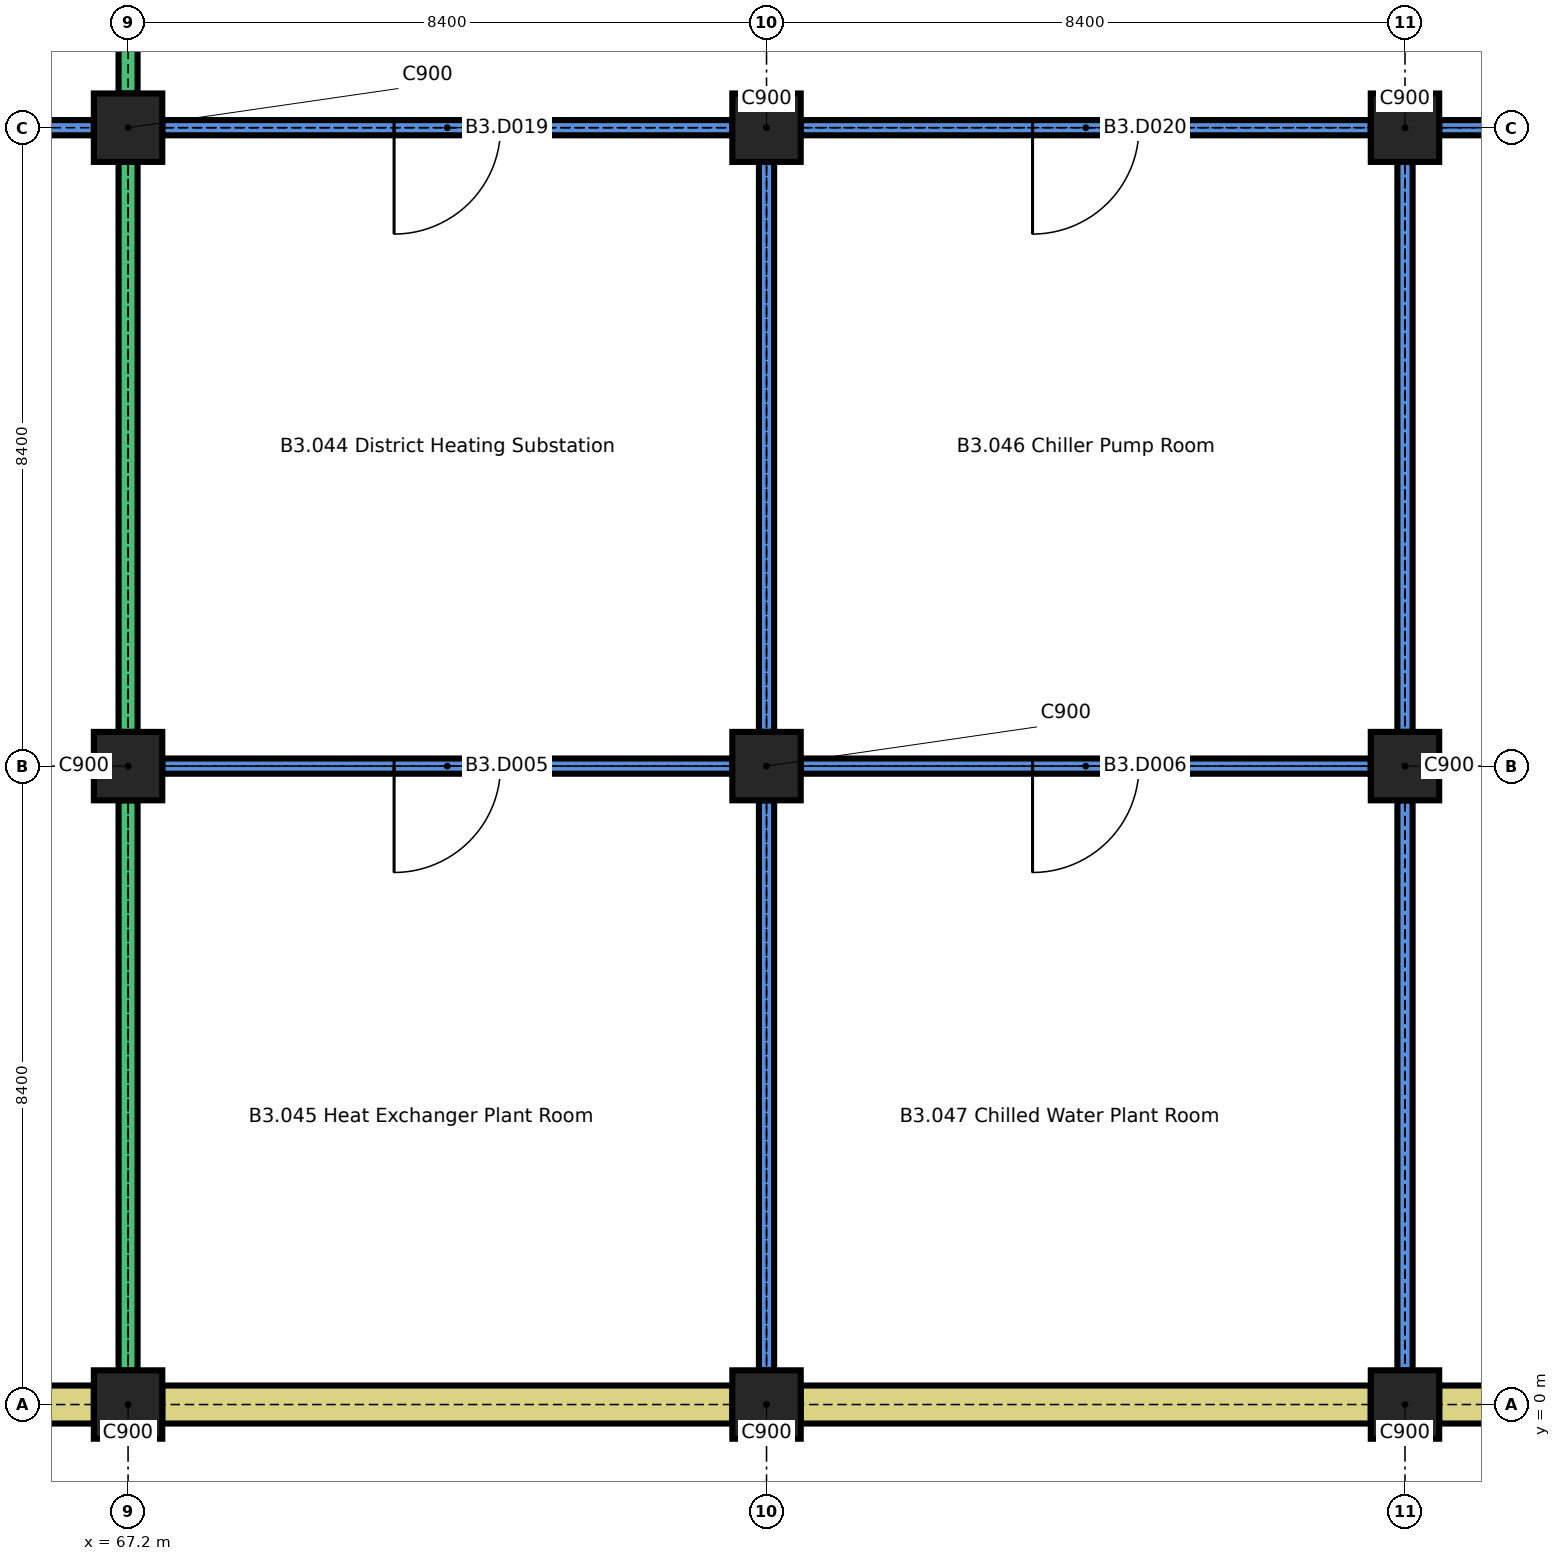
"""IFC4 building model, lengths in metres.
Left out: names, types, materials, properties, quantities, classifications, styles, units other than length and angle.
Written with IfcOpenShell. Run it as: python <this file> out.ifc"""

import sys

from ifc_helpers import new_model, si_unit, direction, frame, frame_2d, origin, origin_2d, place, context, subcontext, project, spatial, rectangle, extrude, element, fill, save


model = new_model("IFC4")
c1 = context("Model", 3, precision=1e-05, world=origin(), true_north=direction((0.0, 1.0)))
c2 = subcontext(c1, "Body", "Model", "MODEL_VIEW")
j1 = project(units=[si_unit("LENGTHUNIT", "METRE"), si_unit("PLANEANGLEUNIT", "RADIAN")], contexts=[c1])
p1 = place(None, origin())
s1 = spatial("IfcSite", under=j1, at=p1, CompositionType="ELEMENT")
p2 = place(p1, origin())
s2 = spatial("IfcBuilding", under=s1, at=p2, CompositionType="ELEMENT")
p3 = place(p2, frame((0.0, 0.0, -11.4)))
s3 = spatial("IfcBuildingStorey", under=s2, at=p3, CompositionType="ELEMENT", Elevation=-11.4)
for number, where, z_axis, x_axis in (
    (1, (67.2, 0.0, 0.0), (0.0, 0.0, 1.0), (1.0, 0.0, 0.0)),
    (2, (75.6, 0.0, 0.0), (0.0, 0.0, 1.0), (1.0, 0.0, 0.0)),
    (3, (84.0, 0.0, 0.0), (0.0, 0.0, 1.0), (1.0, 0.0, 0.0)),
    (4, (67.2, 8.4, 0.0), (0.0, 0.0, 1.0), (1.0, 0.0, 0.0)),
    (5, (75.6, 8.4, 0.0), (0.0, 0.0, 1.0), (1.0, 0.0, 0.0)),
    (6, (84.0, 8.4, 0.0), (0.0, 0.0, 1.0), (1.0, 0.0, 0.0)),
    (7, (67.2, 16.8, 0.0), (0.0, 0.0, 1.0), (1.0, 0.0, 0.0)),
    (8, (75.6, 16.8, 0.0), (0.0, 0.0, 1.0), (1.0, 0.0, 0.0)),
    (9, (84.0, 16.8, 0.0), (0.0, 0.0, 1.0), (1.0, 0.0, 0.0)),
):
    element("IfcColumn", number, at=place(p3, frame(where, z_axis=z_axis, x_axis=x_axis)), inside=s3, PredefinedType="COLUMN", context=c2, shape_type="SweptSolid", body=[
        extrude(rectangle(XDim=0.9, YDim=0.9, at=origin_2d()), origin(), (0.0, 0.0, 1.0), 3.2),
    ])
for number, where, z_axis, x_axis in (
    (10, (59.25, 0.0, 0.0), (0.0, 0.0, 1.0), (1.0, 0.0, 0.0)),
    (11, (67.65, 0.0, 0.0), (0.0, 0.0, 1.0), (1.0, 0.0, 0.0)),
    (12, (76.05, 0.0, 0.0), (0.0, 0.0, 1.0), (1.0, 0.0, 0.0)),
    (13, (84.45, 0.0, 0.0), (0.0, 0.0, 1.0), (1.0, 0.0, 0.0)),
):
    element("IfcWall", number, at=place(p3, frame(where, z_axis=z_axis, x_axis=x_axis)), inside=s3, PredefinedType="SOLIDWALL", context=c2, shape_type="SweptSolid", body=[
        extrude(rectangle(XDim=7.5, YDim=0.5, at=frame_2d((3.75, 0.0))), origin(), (0.0, 0.0, 1.0), 3.2),
    ])
p4 = place(p3, frame((67.65, 8.4, 0.0), z_axis=(0.0, 0.0, 1.0), x_axis=(1.0, 0.0, 0.0)))
e14 = element("IfcWall", 14, at=p4, inside=s3, PredefinedType="PARTITIONING", context=c2, shape_type="SweptSolid", body=[
    extrude(rectangle(XDim=7.5, YDim=0.2, at=frame_2d((3.75, 0.0))), origin(), (0.0, 0.0, 1.0), 3.2),
])
p5 = place(p4, frame((3.05, 0.0, 0.0)))
e15 = element("IfcOpeningElement", 15, at=p5, cuts=e14, PredefinedType="OPENING", context=c2, shape_type="SweptSolid", body=[
    extrude(rectangle(XDim=1.4, YDim=2.1, at=frame_2d((0.7, 1.05))), frame((0.0, 0.11, 0.0), z_axis=(0.0, -1.0, 0.0), x_axis=(1.0, 0.0, 0.0)), (0.0, 0.0, 1.0), 0.22),
])
p6 = place(p3, frame((76.05, 8.4, 0.0), z_axis=(0.0, 0.0, 1.0), x_axis=(1.0, 0.0, 0.0)))
e16 = element("IfcWall", 16, at=p6, inside=s3, PredefinedType="PARTITIONING", context=c2, shape_type="SweptSolid", body=[
    extrude(rectangle(XDim=7.5, YDim=0.2, at=frame_2d((3.75, 0.0))), origin(), (0.0, 0.0, 1.0), 3.2),
])
p7 = place(p6, frame((3.05, 0.0, 0.0)))
e17 = element("IfcOpeningElement", 17, at=p7, cuts=e16, PredefinedType="OPENING", context=c2, shape_type="SweptSolid", body=[
    extrude(rectangle(XDim=1.4, YDim=2.1, at=frame_2d((0.7, 1.05))), frame((0.0, 0.11, 0.0), z_axis=(0.0, -1.0, 0.0), x_axis=(1.0, 0.0, 0.0)), (0.0, 0.0, 1.0), 0.22),
])
p8 = place(p3, frame((59.25, 16.8, 0.0), z_axis=(0.0, 0.0, 1.0), x_axis=(1.0, 0.0, 0.0)))
e18 = element("IfcWall", 18, at=p8, inside=s3, PredefinedType="PARTITIONING", context=c2, shape_type="SweptSolid", body=[
    extrude(rectangle(XDim=7.5, YDim=0.2, at=frame_2d((3.75, 0.0))), origin(), (0.0, 0.0, 1.0), 3.2),
])
p9 = place(p8, frame((3.05, 0.0, 0.0)))
e19 = element("IfcOpeningElement", 19, at=p9, cuts=e18, PredefinedType="OPENING", context=c2, shape_type="SweptSolid", body=[
    extrude(rectangle(XDim=1.4, YDim=2.1, at=frame_2d((0.7, 1.05))), frame((0.0, 0.11, 0.0), z_axis=(0.0, -1.0, 0.0), x_axis=(1.0, 0.0, 0.0)), (0.0, 0.0, 1.0), 0.22),
])
p10 = place(p3, frame((67.65, 16.8, 0.0), z_axis=(0.0, 0.0, 1.0), x_axis=(1.0, 0.0, 0.0)))
e20 = element("IfcWall", 20, at=p10, inside=s3, PredefinedType="PARTITIONING", context=c2, shape_type="SweptSolid", body=[
    extrude(rectangle(XDim=7.5, YDim=0.2, at=frame_2d((3.75, 0.0))), origin(), (0.0, 0.0, 1.0), 3.2),
])
p11 = place(p10, frame((3.05, 0.0, 0.0)))
e21 = element("IfcOpeningElement", 21, at=p11, cuts=e20, PredefinedType="OPENING", context=c2, shape_type="SweptSolid", body=[
    extrude(rectangle(XDim=1.4, YDim=2.1, at=frame_2d((0.7, 1.05))), frame((0.0, 0.11, 0.0), z_axis=(0.0, -1.0, 0.0), x_axis=(1.0, 0.0, 0.0)), (0.0, 0.0, 1.0), 0.22),
])
p12 = place(p3, frame((76.05, 16.8, 0.0), z_axis=(0.0, 0.0, 1.0), x_axis=(1.0, 0.0, 0.0)))
e22 = element("IfcWall", 22, at=p12, inside=s3, PredefinedType="PARTITIONING", context=c2, shape_type="SweptSolid", body=[
    extrude(rectangle(XDim=7.5, YDim=0.2, at=frame_2d((3.75, 0.0))), origin(), (0.0, 0.0, 1.0), 3.2),
])
p13 = place(p12, frame((3.05, 0.0, 0.0)))
e23 = element("IfcOpeningElement", 23, at=p13, cuts=e22, PredefinedType="OPENING", context=c2, shape_type="SweptSolid", body=[
    extrude(rectangle(XDim=1.4, YDim=2.1, at=frame_2d((0.7, 1.05))), frame((0.0, 0.11, 0.0), z_axis=(0.0, -1.0, 0.0), x_axis=(1.0, 0.0, 0.0)), (0.0, 0.0, 1.0), 0.22),
])
p14 = place(p3, frame((84.45, 16.8, 0.0), z_axis=(0.0, 0.0, 1.0), x_axis=(1.0, 0.0, 0.0)))
e24 = element("IfcWall", 24, at=p14, inside=s3, PredefinedType="PARTITIONING", context=c2, shape_type="SweptSolid", body=[
    extrude(rectangle(XDim=15.9, YDim=0.2, at=frame_2d((7.95, 0.0))), origin(), (0.0, 0.0, 1.0), 3.2),
])
p15 = place(p14, frame((3.275, 0.0, 0.0)))
e25 = element("IfcOpeningElement", 25, at=p15, cuts=e24, PredefinedType="OPENING", context=c2, shape_type="SweptSolid", body=[
    extrude(rectangle(XDim=1.4, YDim=2.1, at=frame_2d((0.7, 1.05))), frame((0.0, 0.11, 0.0), z_axis=(0.0, -1.0, 0.0), x_axis=(1.0, 0.0, 0.0)), (0.0, 0.0, 1.0), 0.22),
])
p16 = place(p14, frame((13.325, 0.0, 0.0)))
e26 = element("IfcOpeningElement", 26, at=p16, cuts=e24, PredefinedType="OPENING", context=c2, shape_type="SweptSolid", body=[
    extrude(rectangle(XDim=1.4, YDim=2.1, at=frame_2d((0.7, 1.05))), frame((0.0, 0.11, 0.0), z_axis=(0.0, -1.0, 0.0), x_axis=(1.0, 0.0, 0.0)), (0.0, 0.0, 1.0), 0.22),
])
for number, where, z_axis, x_axis in (
    (27, (67.2, 0.45, 0.0), (0.0, 0.0, 1.0), (0.0, 1.0, 0.0)),
    (28, (67.2, 8.85, 0.0), (0.0, 0.0, 1.0), (0.0, 1.0, 0.0)),
):
    element("IfcWall", number, at=place(p3, frame(where, z_axis=z_axis, x_axis=x_axis)), inside=s3, PredefinedType="SOLIDWALL", context=c2, shape_type="SweptSolid", body=[
        extrude(rectangle(XDim=7.5, YDim=0.25, at=frame_2d((3.75, 0.0))), origin(), (0.0, 0.0, 1.0), 3.2),
    ])
p17 = place(p3, frame((67.2, 17.25, 0.0), z_axis=(0.0, 0.0, 1.0), x_axis=(0.0, 1.0, 0.0)))
e29 = element("IfcWall", 29, at=p17, inside=s3, PredefinedType="SOLIDWALL", context=c2, shape_type="SweptSolid", body=[
    extrude(rectangle(XDim=12.75, YDim=0.25, at=frame_2d((6.375, 0.0))), origin(), (0.0, 0.0, 1.0), 3.2),
])
p18 = place(p17, frame((1.475, 0.0, 0.0)))
e30 = element("IfcOpeningElement", 30, at=p18, cuts=e29, PredefinedType="OPENING", context=c2, shape_type="SweptSolid", body=[
    extrude(rectangle(XDim=1.4, YDim=2.1, at=frame_2d((0.7, 1.05))), frame((0.0, 0.135, 0.0), z_axis=(0.0, -1.0, 0.0), x_axis=(1.0, 0.0, 0.0)), (0.0, 0.0, 1.0), 0.27),
])
for number, where, z_axis, x_axis in (
    (31, (75.6, 0.45, 0.0), (0.0, 0.0, 1.0), (0.0, 1.0, 0.0)),
    (32, (75.6, 8.85, 0.0), (0.0, 0.0, 1.0), (0.0, 1.0, 0.0)),
    (33, (84.0, 0.45, 0.0), (0.0, 0.0, 1.0), (0.0, 1.0, 0.0)),
    (34, (84.0, 8.85, 0.0), (0.0, 0.0, 1.0), (0.0, 1.0, 0.0)),
):
    element("IfcWall", number, at=place(p3, frame(where, z_axis=z_axis, x_axis=x_axis)), inside=s3, PredefinedType="PARTITIONING", context=c2, shape_type="SweptSolid", body=[
        extrude(rectangle(XDim=7.5, YDim=0.2, at=frame_2d((3.75, 0.0))), origin(), (0.0, 0.0, 1.0), 3.2),
    ])
p19 = place(p5, origin())
e35 = element("IfcDoor", 35, at=p19, inside=s3, OperationType="SINGLE_SWING_LEFT", PredefinedType="DOOR", context=c2, shape_type="SweptSolid", body=[
    extrude(rectangle(XDim=1.4, YDim=2.1, at=frame_2d((0.7, 1.05))), frame((0.0, 0.025, 0.0), z_axis=(0.0, -1.0, 0.0), x_axis=(1.0, 0.0, 0.0)), (0.0, 0.0, 1.0), 0.05),
])
fill(e15, e35)
p20 = place(p7, origin())
e36 = element("IfcDoor", 36, at=p20, inside=s3, OperationType="SINGLE_SWING_LEFT", PredefinedType="DOOR", context=c2, shape_type="SweptSolid", body=[
    extrude(rectangle(XDim=1.4, YDim=2.1, at=frame_2d((0.7, 1.05))), frame((0.0, 0.025, 0.0), z_axis=(0.0, -1.0, 0.0), x_axis=(1.0, 0.0, 0.0)), (0.0, 0.0, 1.0), 0.05),
])
fill(e17, e36)
p21 = place(p11, origin())
e37 = element("IfcDoor", 37, at=p21, inside=s3, OperationType="SINGLE_SWING_LEFT", PredefinedType="DOOR", context=c2, shape_type="SweptSolid", body=[
    extrude(rectangle(XDim=1.4, YDim=2.1, at=frame_2d((0.7, 1.05))), frame((0.0, 0.025, 0.0), z_axis=(0.0, -1.0, 0.0), x_axis=(1.0, 0.0, 0.0)), (0.0, 0.0, 1.0), 0.05),
])
fill(e21, e37)
p22 = place(p13, origin())
e38 = element("IfcDoor", 38, at=p22, inside=s3, OperationType="SINGLE_SWING_LEFT", PredefinedType="DOOR", context=c2, shape_type="SweptSolid", body=[
    extrude(rectangle(XDim=1.4, YDim=2.1, at=frame_2d((0.7, 1.05))), frame((0.0, 0.025, 0.0), z_axis=(0.0, -1.0, 0.0), x_axis=(1.0, 0.0, 0.0)), (0.0, 0.0, 1.0), 0.05),
])
fill(e23, e38)
save(model, sys.argv[1])
